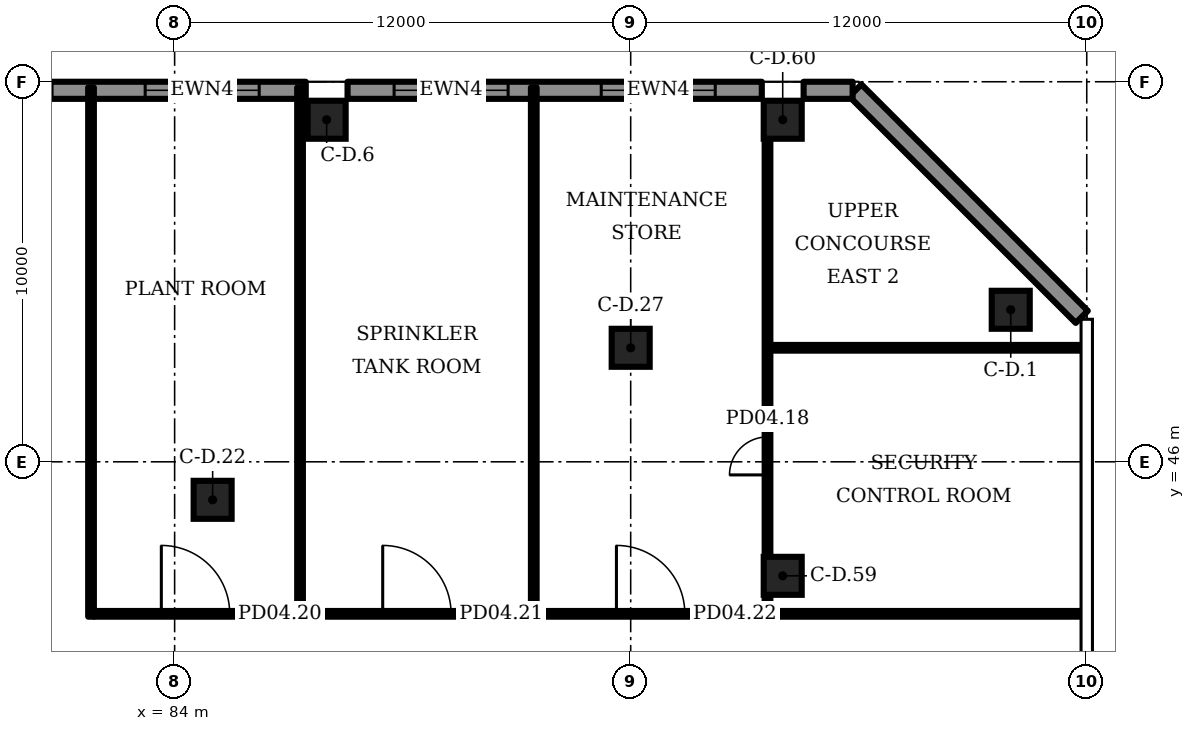
"""IFC4 building model, lengths in metres.
Left out: names, types, materials, properties, quantities, classifications, styles, units other than length and angle.
Written with IfcOpenShell. Run it as: python <this file> out.ifc"""

import sys

from ifc_helpers import new_model, si_unit, direction, frame, frame_2d, origin, origin_2d, place, context, subcontext, project, spatial, rectangle, extrude, element, fill, save


model = new_model("IFC4")
c1 = context("Model", 3, precision=1e-05, world=origin(), true_north=direction((0.0, 1.0)))
c2 = subcontext(c1, "Body", "Model", "MODEL_VIEW")
j1 = project(units=[si_unit("LENGTHUNIT", "METRE"), si_unit("PLANEANGLEUNIT", "RADIAN")], contexts=[c1])
p1 = place(None, origin())
s1 = spatial("IfcSite", under=j1, at=p1, CompositionType="ELEMENT")
p2 = place(p1, origin())
s2 = spatial("IfcBuilding", under=s1, at=p2, CompositionType="ELEMENT")
p3 = place(p2, frame((0.0, 0.0, 27.5)))
s3 = spatial("IfcBuildingStorey", under=s2, at=p3, CompositionType="ELEMENT", Elevation=27.5)
for number, where, z_axis, x_axis in (
    (1, (106.0, 50.0, 0.0), (0.0, 0.0, 1.0), (1.0, 0.0, 0.0)),
    (2, (88.0, 55.0, 0.0), (0.0, 0.0, 1.0), (1.0, 0.0, 0.0)),
    (3, (85.0, 45.0, 0.0), (0.0, 0.0, 1.0), (1.0, 0.0, 0.0)),
    (4, (96.0, 49.0, 0.0), (0.0, 0.0, 1.0), (1.0, 0.0, 0.0)),
    (5, (100.0, 43.0, 0.0), (0.0, 0.0, 1.0), (1.0, 0.0, 0.0)),
    (6, (100.0, 55.0, 0.0), (0.0, 0.0, 1.0), (1.0, 0.0, 0.0)),
):
    element("IfcColumn", number, at=place(p3, frame(where, z_axis=z_axis, x_axis=x_axis)), inside=s3, PredefinedType="COLUMN", context=c2, shape_type="SweptSolid", body=[
        extrude(rectangle(XDim=1.0, YDim=1.0, at=origin_2d()), origin(), (0.0, 0.0, 1.0), 5.5),
    ])
p4 = place(p3, frame((107.869, 49.812, 0.0), z_axis=(0.0, 0.0, 1.0), x_axis=(-0.707092, 0.707121, 0.0)))
e7 = element("IfcWall", 7, at=p4, inside=s3, PredefinedType="SOLIDWALL", context=c2, shape_type="SweptSolid", body=[
    extrude(rectangle(XDim=8.425, YDim=0.45, at=frame_2d((4.213, 0.0))), origin(), (0.0, 0.0, 1.0), 5.2),
])
p5 = place(p3, frame((99.45, 55.775, 0.0), z_axis=(0.0, 0.0, 1.0), x_axis=(-1.0, 0.0, 0.0)))
e8 = element("IfcWall", 8, at=p5, inside=s3, PredefinedType="SOLIDWALL", context=c2, shape_type="SweptSolid", body=[
    extrude(rectangle(XDim=10.9, YDim=0.45, at=frame_2d((5.45, 0.0))), origin(), (0.0, 0.0, 1.0), 5.2),
])
p6 = place(p5, frame((1.225, 0.0, 1.0)))
e9 = element("IfcOpeningElement", 9, at=p6, cuts=e8, PredefinedType="OPENING", context=c2, shape_type="SweptSolid", body=[
    extrude(rectangle(XDim=3.0, YDim=3.2, at=frame_2d((1.5, 1.6))), frame((0.0, 0.235, 0.0), z_axis=(0.0, -1.0, 0.0), x_axis=(1.0, 0.0, 0.0)), (0.0, 0.0, 1.0), 0.47),
])
p7 = place(p5, frame((6.675, 0.0, 1.0)))
e10 = element("IfcOpeningElement", 10, at=p7, cuts=e8, PredefinedType="OPENING", context=c2, shape_type="SweptSolid", body=[
    extrude(rectangle(XDim=3.0, YDim=3.2, at=frame_2d((1.5, 1.6))), frame((0.0, 0.235, 0.0), z_axis=(0.0, -1.0, 0.0), x_axis=(1.0, 0.0, 0.0)), (0.0, 0.0, 1.0), 0.47),
])
p8 = place(p3, frame((87.45, 55.775, 0.0), z_axis=(0.0, 0.0, 1.0), x_axis=(-1.0, 0.0, 0.0)))
e11 = element("IfcWall", 11, at=p8, inside=s3, PredefinedType="SOLIDWALL", context=c2, shape_type="SweptSolid", body=[
    extrude(rectangle(XDim=10.9, YDim=0.45, at=frame_2d((5.45, 0.0))), origin(), (0.0, 0.0, 1.0), 5.2),
])
p9 = place(p8, frame((1.225, 0.0, 1.0)))
e12 = element("IfcOpeningElement", 12, at=p9, cuts=e11, PredefinedType="OPENING", context=c2, shape_type="SweptSolid", body=[
    extrude(rectangle(XDim=3.0, YDim=3.2, at=frame_2d((1.5, 1.6))), frame((0.0, 0.235, 0.0), z_axis=(0.0, -1.0, 0.0), x_axis=(1.0, 0.0, 0.0)), (0.0, 0.0, 1.0), 0.47),
])
p10 = place(p8, frame((6.675, 0.0, 1.0)))
e13 = element("IfcOpeningElement", 13, at=p10, cuts=e11, PredefinedType="OPENING", context=c2, shape_type="SweptSolid", body=[
    extrude(rectangle(XDim=3.0, YDim=3.2, at=frame_2d((1.5, 1.6))), frame((0.0, 0.235, 0.0), z_axis=(0.0, -1.0, 0.0), x_axis=(1.0, 0.0, 0.0)), (0.0, 0.0, 1.0), 0.47),
])
p11 = place(p3, frame((101.84, 55.775, 0.0), z_axis=(0.0, 0.0, 1.0), x_axis=(-1.0, 0.0, 0.0)))
e14 = element("IfcWall", 14, at=p11, inside=s3, PredefinedType="SOLIDWALL", context=c2, shape_type="SweptSolid", body=[
    extrude(rectangle(XDim=1.29, YDim=0.45, at=frame_2d((0.645, 0.0))), origin(), (0.0, 0.0, 1.0), 5.2),
])
p12 = place(p3, frame((81.875, 42.0, 0.0), z_axis=(0.0, 0.0, 1.0), x_axis=(1.0, 0.0, 0.0)))
e15 = element("IfcWall", 15, at=p12, inside=s3, PredefinedType="PARTITIONING", context=c2, shape_type="SweptSolid", body=[
    extrude(rectangle(XDim=5.35, YDim=0.15, at=frame_2d((2.675, 0.0))), origin(), (0.0, 0.0, 1.0), 5.2),
])
p13 = place(p12, frame((1.775, 0.0, 0.0)))
e16 = element("IfcOpeningElement", 16, at=p13, cuts=e15, PredefinedType="OPENING", context=c2, shape_type="SweptSolid", body=[
    extrude(rectangle(XDim=1.8, YDim=2.1, at=frame_2d((0.9, 1.05))), frame((0.0, 0.085, 0.0), z_axis=(0.0, -1.0, 0.0), x_axis=(1.0, 0.0, 0.0)), (0.0, 0.0, 1.0), 0.17),
])
p14 = place(p3, frame((87.375, 42.0, 0.0), z_axis=(0.0, 0.0, 1.0), x_axis=(1.0, 0.0, 0.0)))
e17 = element("IfcWall", 17, at=p14, inside=s3, PredefinedType="PARTITIONING", context=c2, shape_type="SweptSolid", body=[
    extrude(rectangle(XDim=6.0, YDim=0.15, at=frame_2d((3.0, 0.0))), origin(), (0.0, 0.0, 1.0), 5.2),
])
p15 = place(p14, frame((2.1, 0.0, 0.0)))
e18 = element("IfcOpeningElement", 18, at=p15, cuts=e17, PredefinedType="OPENING", context=c2, shape_type="SweptSolid", body=[
    extrude(rectangle(XDim=1.8, YDim=2.1, at=frame_2d((0.9, 1.05))), frame((0.0, 0.085, 0.0), z_axis=(0.0, -1.0, 0.0), x_axis=(1.0, 0.0, 0.0)), (0.0, 0.0, 1.0), 0.17),
])
p16 = place(p3, frame((93.525, 42.0, 0.0), z_axis=(0.0, 0.0, 1.0), x_axis=(1.0, 0.0, 0.0)))
e19 = element("IfcWall", 19, at=p16, inside=s3, PredefinedType="PARTITIONING", context=c2, shape_type="SweptSolid", body=[
    extrude(rectangle(XDim=6.0, YDim=0.15, at=frame_2d((3.0, 0.0))), origin(), (0.0, 0.0, 1.0), 5.2),
])
p17 = place(p16, frame((2.1, 0.0, 0.0)))
e20 = element("IfcOpeningElement", 20, at=p17, cuts=e19, PredefinedType="OPENING", context=c2, shape_type="SweptSolid", body=[
    extrude(rectangle(XDim=1.8, YDim=2.1, at=frame_2d((0.9, 1.05))), frame((0.0, 0.085, 0.0), z_axis=(0.0, -1.0, 0.0), x_axis=(1.0, 0.0, 0.0)), (0.0, 0.0, 1.0), 0.17),
])
for number, where, z_axis, x_axis in (
    (21, (99.675, 42.0, 0.0), (0.0, 0.0, 1.0), (1.0, 0.0, 0.0)),
    (22, (99.675, 49.0, 0.0), (0.0, 0.0, 1.0), (1.0, 0.0, 0.0)),
):
    element("IfcWall", number, at=place(p3, frame(where, z_axis=z_axis, x_axis=x_axis)), inside=s3, PredefinedType="PARTITIONING", context=c2, shape_type="SweptSolid", body=[
        extrude(rectangle(XDim=8.22, YDim=0.15, at=frame_2d((4.11, 0.0))), origin(), (0.0, 0.0, 1.0), 5.2),
    ])
p18 = place(p3, frame((99.6, 41.925, 0.0), z_axis=(0.0, 0.0, 1.0), x_axis=(0.0, 1.0, 0.0)))
e23 = element("IfcWall", 23, at=p18, inside=s3, PredefinedType="PARTITIONING", context=c2, shape_type="SweptSolid", body=[
    extrude(rectangle(XDim=0.565, YDim=0.15, at=frame_2d((0.282, 0.0))), origin(), (0.0, 0.0, 1.0), 5.2),
])
p19 = place(p3, frame((99.6, 43.51, 0.0), z_axis=(0.0, 0.0, 1.0), x_axis=(0.0, 1.0, 0.0)))
e24 = element("IfcWall", 24, at=p19, inside=s3, PredefinedType="PARTITIONING", context=c2, shape_type="SweptSolid", body=[
    extrude(rectangle(XDim=10.98, YDim=0.15, at=frame_2d((5.49, 0.0))), origin(), (0.0, 0.0, 1.0), 5.2),
])
p20 = place(p19, frame((2.145, 0.0, 0.0)))
e25 = element("IfcOpeningElement", 25, at=p20, cuts=e24, PredefinedType="OPENING", context=c2, shape_type="SweptSolid", body=[
    extrude(rectangle(XDim=1.0, YDim=2.1, at=frame_2d((0.5, 1.05))), frame((0.0, 0.085, 0.0), z_axis=(0.0, -1.0, 0.0), x_axis=(1.0, 0.0, 0.0)), (0.0, 0.0, 1.0), 0.17),
])
for number, where, z_axis, x_axis in (
    (26, (87.3, 41.925, 0.0), (0.0, 0.0, 1.0), (0.0, 1.0, 0.0)),
    (27, (81.8, 41.925, 0.0), (0.0, 0.0, 1.0), (0.0, 1.0, 0.0)),
    (28, (93.45, 41.925, 0.0), (0.0, 0.0, 1.0), (0.0, 1.0, 0.0)),
):
    element("IfcWall", number, at=place(p3, frame(where, z_axis=z_axis, x_axis=x_axis)), inside=s3, PredefinedType="PARTITIONING", context=c2, shape_type="SweptSolid", body=[
        extrude(rectangle(XDim=13.925, YDim=0.15, at=frame_2d((6.962, 0.0))), origin(), (0.0, 0.0, 1.0), 5.2),
    ])
p21 = place(p6, origin())
e29 = element("IfcWindow", 29, at=p21, inside=s3, PartitioningType="SINGLE_PANEL", PredefinedType="WINDOW", context=c2, shape_type="SweptSolid", body=[
    extrude(rectangle(XDim=3.0, YDim=3.2, at=frame_2d((1.5, 1.6))), frame((0.0, 0.105, 0.0), z_axis=(0.0, -1.0, 0.0), x_axis=(1.0, 0.0, 0.0)), (0.0, 0.0, 1.0), 0.06),
])
fill(e9, e29)
p22 = place(p7, origin())
e30 = element("IfcWindow", 30, at=p22, inside=s3, PartitioningType="SINGLE_PANEL", PredefinedType="WINDOW", context=c2, shape_type="SweptSolid", body=[
    extrude(rectangle(XDim=3.0, YDim=3.2, at=frame_2d((1.5, 1.6))), frame((0.0, 0.105, 0.0), z_axis=(0.0, -1.0, 0.0), x_axis=(1.0, 0.0, 0.0)), (0.0, 0.0, 1.0), 0.06),
])
fill(e10, e30)
p23 = place(p9, origin())
e31 = element("IfcWindow", 31, at=p23, inside=s3, PartitioningType="SINGLE_PANEL", PredefinedType="WINDOW", context=c2, shape_type="SweptSolid", body=[
    extrude(rectangle(XDim=3.0, YDim=3.2, at=frame_2d((1.5, 1.6))), frame((0.0, 0.105, 0.0), z_axis=(0.0, -1.0, 0.0), x_axis=(1.0, 0.0, 0.0)), (0.0, 0.0, 1.0), 0.06),
])
fill(e12, e31)
p24 = place(p20, origin())
e32 = element("IfcDoor", 32, at=p24, inside=s3, OperationType="SINGLE_SWING_LEFT", PredefinedType="DOOR", context=c2, shape_type="SweptSolid", body=[
    extrude(rectangle(XDim=1.0, YDim=2.1, at=frame_2d((0.5, 1.05))), frame((0.0, 0.025, 0.0), z_axis=(0.0, -1.0, 0.0), x_axis=(1.0, 0.0, 0.0)), (0.0, 0.0, 1.0), 0.05),
])
fill(e25, e32)
p25 = place(p13, origin())
e33 = element("IfcDoor", 33, at=p25, inside=s3, OperationType="DOUBLE_DOOR_SINGLE_SWING", PredefinedType="DOOR", context=c2, shape_type="SweptSolid", body=[
    extrude(rectangle(XDim=1.8, YDim=2.1, at=frame_2d((0.9, 1.05))), frame((0.0, 0.025, 0.0), z_axis=(0.0, -1.0, 0.0), x_axis=(1.0, 0.0, 0.0)), (0.0, 0.0, 1.0), 0.05),
])
fill(e16, e33)
p26 = place(p15, origin())
e34 = element("IfcDoor", 34, at=p26, inside=s3, OperationType="DOUBLE_DOOR_SINGLE_SWING", PredefinedType="DOOR", context=c2, shape_type="SweptSolid", body=[
    extrude(rectangle(XDim=1.8, YDim=2.1, at=frame_2d((0.9, 1.05))), frame((0.0, 0.025, 0.0), z_axis=(0.0, -1.0, 0.0), x_axis=(1.0, 0.0, 0.0)), (0.0, 0.0, 1.0), 0.05),
])
fill(e18, e34)
p27 = place(p17, origin())
e35 = element("IfcDoor", 35, at=p27, inside=s3, OperationType="DOUBLE_DOOR_SINGLE_SWING", PredefinedType="DOOR", context=c2, shape_type="SweptSolid", body=[
    extrude(rectangle(XDim=1.8, YDim=2.1, at=frame_2d((0.9, 1.05))), frame((0.0, 0.025, 0.0), z_axis=(0.0, -1.0, 0.0), x_axis=(1.0, 0.0, 0.0)), (0.0, 0.0, 1.0), 0.05),
])
fill(e20, e35)
save(model, sys.argv[1])
